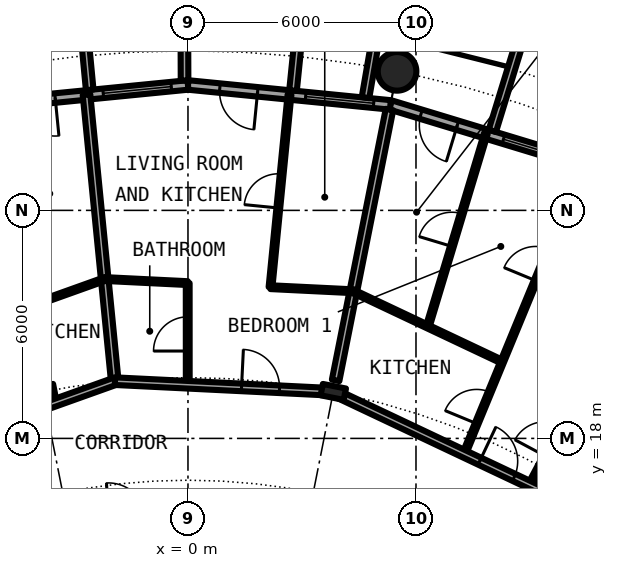
"""IFC4 building model, lengths in metres.
Left out: names, types, materials, properties, quantities, classifications, styles, units other than length and angle.
Written with IfcOpenShell. Run it as: python <this file> out.ifc"""

import sys

from ifc_helpers import new_model, si_unit, direction, frame, frame_2d, origin, origin_2d, place, context, subcontext, project, spatial, rectangle, circle, hollow_circle, i_section, extrude, element, fill, save


model = new_model("IFC4")
c1 = context("Model", 3, precision=1e-05, world=origin(), true_north=direction((0.0, 1.0)))
c2 = subcontext(c1, "Body", "Model", "MODEL_VIEW")
j1 = project(units=[si_unit("LENGTHUNIT", "METRE"), si_unit("PLANEANGLEUNIT", "RADIAN")], contexts=[c1])
p1 = place(None, origin())
s1 = spatial("IfcSite", under=j1, at=p1, CompositionType="ELEMENT")
p2 = place(p1, origin())
s2 = spatial("IfcBuilding", under=s1, at=p2, CompositionType="ELEMENT")
p3 = place(p2, frame((0.0, 0.0, 41.1)))
s3 = spatial("IfcBuildingStorey", under=s2, at=p3, CompositionType="ELEMENT", Elevation=41.1)
p4 = place(p3, frame((5.501, 27.658, 0.0), z_axis=(0.0, 0.0, 1.0), x_axis=(1.0, 0.0, 0.0)))
e1 = element("IfcColumn", 1, at=p4, inside=s3, PredefinedType="COLUMN", context=c2, shape_type="SweptSolid", body=[
    extrude(hollow_circle(Radius=0.508, WallThickness=0.05, at=origin_2d()), origin(), (0.0, 0.0, 1.0), 3.05),
])
for number, where, z_axis, x_axis in (
    (2, (3.824, 19.223, 0.0), (0.0, 0.0, 1.0), (0.195, 0.981, 0.0)),
    (3, (-3.824, 19.223, 0.0), (0.0, 0.0, 1.0), (-0.195, 0.981, 0.0)),
):
    element("IfcColumn", number, at=place(p3, frame(where, z_axis=z_axis, x_axis=x_axis)), inside=s3, PredefinedType="COLUMN", context=c2, shape_type="SweptSolid", body=[
        extrude(i_section(OverallWidth=0.305, OverallDepth=0.62, WebThickness=0.021, FlangeThickness=0.04, FilletRadius=0.027, at=origin_2d()), origin(), (0.0, 0.0, 1.0), 3.05),
    ])
p5 = place(p3, frame((10.447, 25.222, 0.0), z_axis=(0.0, 0.0, 1.0), x_axis=(-0.956965678721, 0.290201119486, 0.0)))
e4 = element("IfcWall", 4, at=p5, inside=s3, PredefinedType="SOLIDWALL", context=c2, shape_type="SweptSolid", body=[
    extrude(rectangle(XDim=5.351, YDim=0.25, at=frame_2d((2.676, 0.0))), origin(), (0.0, 0.0, 1.0), 2.7),
])
p6 = place(p5, frame((0.441, 0.0, 0.3)))
e5 = element("IfcOpeningElement", 5, at=p6, cuts=e4, PredefinedType="OPENING", context=c2, shape_type="SweptSolid", body=[
    extrude(rectangle(XDim=1.8, YDim=2.1, at=frame_2d((0.9, 1.05))), frame((0.0, 0.135, 0.0), z_axis=(0.0, -1.0, 0.0), x_axis=(1.0, 0.0, 0.0)), (0.0, 0.0, 1.0), 0.27),
])
p7 = place(p5, frame((3.51, 0.0, 0.0)))
e6 = element("IfcOpeningElement", 6, at=p7, cuts=e4, PredefinedType="OPENING", context=c2, shape_type="SweptSolid", body=[
    extrude(rectangle(XDim=1.0, YDim=2.2, at=frame_2d((0.5, 1.1))), frame((0.0, 0.135, 0.0), z_axis=(0.0, -1.0, 0.0), x_axis=(1.0, 0.0, 0.0)), (0.0, 0.0, 1.0), 0.27),
])
p8 = place(p3, frame((11.638, 28.084, -0.03), z_axis=(0.0, 0.0, 1.0), x_axis=(-0.941461077774, 0.337121697664, 0.0)))
e7 = element("IfcWall", 7, at=p8, inside=s3, PredefinedType="SOLIDWALL", context=c2, shape_type="SweptSolid", body=[
    extrude(rectangle(XDim=2.993, YDim=0.2, at=frame_2d((1.497, 0.0))), origin(), (0.0, 0.0, 1.0), 2.73),
])
p9 = place(p8, frame((0.457, 0.0, 0.33)))
e8 = element("IfcOpeningElement", 8, at=p9, cuts=e7, PredefinedType="OPENING", context=c2, shape_type="SweptSolid", body=[
    extrude(circle(Radius=1.04, at=frame_2d((1.04, 1.04))), frame((0.0, 0.11, 0.0), z_axis=(0.0, -1.0, 0.0), x_axis=(1.0, 0.0, 0.0)), (0.0, 0.0, 1.0), 0.22),
])
p10 = place(p3, frame((8.009, 26.092, -0.03), z_axis=(0.0, 0.0, 1.0), x_axis=(0.293406695073, 0.955987715029, 0.0)))
e9 = element("IfcWall", 9, at=p10, inside=s3, PredefinedType="SOLIDWALL", context=c2, shape_type="SweptSolid", body=[
    extrude(rectangle(XDim=3.006, YDim=0.2, at=frame_2d((1.503, 0.0))), origin(), (0.0, 0.0, 1.0), 2.73),
])
p11 = place(p3, frame((5.326, 26.775, 0.0), z_axis=(0.0, 0.0, 1.0), x_axis=(-0.995173996315, 0.098126026407, 0.0)))
e10 = element("IfcWall", 10, at=p11, inside=s3, PredefinedType="SOLIDWALL", context=c2, shape_type="SweptSolid", body=[
    extrude(rectangle(XDim=5.352, YDim=0.25, at=frame_2d((2.676, 0.0))), origin(), (0.0, 0.0, 1.0), 2.7),
])
p12 = place(p11, frame((0.441, 0.0, 0.3)))
e11 = element("IfcOpeningElement", 11, at=p12, cuts=e10, PredefinedType="OPENING", context=c2, shape_type="SweptSolid", body=[
    extrude(rectangle(XDim=1.8, YDim=2.1, at=frame_2d((0.9, 1.05))), frame((0.0, 0.135, 0.0), z_axis=(0.0, -1.0, 0.0), x_axis=(1.0, 0.0, 0.0)), (0.0, 0.0, 1.0), 0.27),
])
p13 = place(p11, frame((3.51, 0.0, 0.0)))
e12 = element("IfcOpeningElement", 12, at=p13, cuts=e10, PredefinedType="OPENING", context=c2, shape_type="SweptSolid", body=[
    extrude(rectangle(XDim=1.0, YDim=2.2, at=frame_2d((0.5, 1.1))), frame((0.0, 0.135, 0.0), z_axis=(0.0, -1.0, 0.0), x_axis=(1.0, 0.0, 0.0)), (0.0, 0.0, 1.0), 0.27),
])
p14 = place(p3, frame((4.671, 26.966, -0.03), z_axis=(0.0, 0.0, 1.0), x_axis=(0.170539878907, 0.985350774954, 0.0)))
e13 = element("IfcWall", 13, at=p14, inside=s3, PredefinedType="SOLIDWALL", context=c2, shape_type="SweptSolid", body=[
    extrude(rectangle(XDim=2.932, YDim=0.2, at=frame_2d((1.466, 0.0))), origin(), (0.0, 0.0, 1.0), 2.73),
])
p15 = place(p3, frame((2.764, 27.153, -0.03), z_axis=(0.0, 0.0, 1.0), x_axis=(0.101505487237, 0.994834979311, 0.0)))
e14 = element("IfcWall", 14, at=p15, inside=s3, PredefinedType="SOLIDWALL", context=c2, shape_type="SweptSolid", body=[
    extrude(rectangle(XDim=3.007, YDim=0.2, at=frame_2d((1.503, 0.0))), origin(), (0.0, 0.0, 1.0), 2.73),
])
p16 = place(p3, frame((0.0, 27.3, 0.0), z_axis=(0.0, 0.0, 1.0), x_axis=(-0.995173996315, -0.098126026407, 0.0)))
e15 = element("IfcWall", 15, at=p16, inside=s3, PredefinedType="SOLIDWALL", context=c2, shape_type="SweptSolid", body=[
    extrude(rectangle(XDim=5.352, YDim=0.25, at=frame_2d((2.676, 0.0))), origin(), (0.0, 0.0, 1.0), 2.7),
])
p17 = place(p16, frame((0.441, 0.0, 0.3)))
e16 = element("IfcOpeningElement", 16, at=p17, cuts=e15, PredefinedType="OPENING", context=c2, shape_type="SweptSolid", body=[
    extrude(rectangle(XDim=1.8, YDim=2.1, at=frame_2d((0.9, 1.05))), frame((0.0, 0.135, 0.0), z_axis=(0.0, -1.0, 0.0), x_axis=(1.0, 0.0, 0.0)), (0.0, 0.0, 1.0), 0.27),
])
p18 = place(p16, frame((3.51, 0.0, 0.0)))
e17 = element("IfcOpeningElement", 17, at=p18, cuts=e15, PredefinedType="OPENING", context=c2, shape_type="SweptSolid", body=[
    extrude(rectangle(XDim=1.0, YDim=2.2, at=frame_2d((0.5, 1.1))), frame((0.0, 0.135, 0.0), z_axis=(0.0, -1.0, 0.0), x_axis=(1.0, 0.0, 0.0)), (0.0, 0.0, 1.0), 0.27),
])
p19 = place(p3, frame((-0.09, 27.417, -0.03), z_axis=(0.0, 0.0, 1.0), x_axis=(-0.00347308367, 0.999993968827, 0.0)))
e18 = element("IfcWall", 18, at=p19, inside=s3, PredefinedType="SOLIDWALL", context=c2, shape_type="SweptSolid", body=[
    extrude(rectangle(XDim=2.882, YDim=0.2, at=frame_2d((1.441, 0.0))), origin(), (0.0, 0.0, 1.0), 2.73),
])
p20 = place(p3, frame((-2.586, 27.171, -0.03), z_axis=(0.0, 0.0, 1.0), x_axis=(-0.094548432284, 0.995520262954, 0.0)))
e19 = element("IfcWall", 19, at=p20, inside=s3, PredefinedType="SOLIDWALL", context=c2, shape_type="SweptSolid", body=[
    extrude(rectangle(XDim=3.006, YDim=0.2, at=frame_2d((1.503, 0.0))), origin(), (0.0, 0.0, 1.0), 2.73),
])
p21 = place(p3, frame((-2.67, 27.043, 0.0), z_axis=(0.0, 0.0, 1.0), x_axis=(0.098208010272, -0.995165909142, 0.0)))
e20 = element("IfcWall", 20, at=p21, inside=s3, PredefinedType="PARTITIONING", context=c2, shape_type="SweptSolid", body=[
    extrude(rectangle(XDim=7.575, YDim=0.2, at=frame_2d((3.787, 0.0))), origin(), (0.0, 0.0, 1.0), 2.7),
])
p22 = place(p3, frame((-0.006, 19.412, 0.0), z_axis=(0.0, 0.0, 1.0), x_axis=(-0.000365230071, 0.999999933303, 0.0)))
e21 = element("IfcWall", 21, at=p22, inside=s3, PredefinedType="PARTITIONING", context=c2, shape_type="SweptSolid", body=[
    extrude(rectangle(XDim=2.674, YDim=0.1, at=frame_2d((1.337, 0.0))), origin(), (0.0, 0.0, 1.0), 2.7),
])
p23 = place(p22, frame((0.887, 0.0, 0.0)))
e22 = element("IfcOpeningElement", 22, at=p23, cuts=e21, PredefinedType="OPENING", context=c2, shape_type="SweptSolid", body=[
    extrude(rectangle(XDim=0.9, YDim=2.3, at=frame_2d((0.45, 1.15))), frame((0.0, 0.06, 0.0), z_axis=(0.0, -1.0, 0.0), x_axis=(1.0, 0.0, 0.0)), (0.0, 0.0, 1.0), 0.12),
])
p24 = place(p3, frame((2.172, 21.979, 0.0), z_axis=(0.0, 0.0, 1.0), x_axis=(0.098259061871, 0.99516086979, 0.0)))
e23 = element("IfcWall", 23, at=p24, inside=s3, PredefinedType="PARTITIONING", context=c2, shape_type="SweptSolid", body=[
    extrude(rectangle(XDim=5.089, YDim=0.1, at=frame_2d((2.544, 0.0))), origin(), (0.0, 0.0, 1.0), 2.7),
])
p25 = place(p24, frame((2.094, 0.0, 0.0)))
e24 = element("IfcOpeningElement", 24, at=p25, cuts=e23, PredefinedType="OPENING", context=c2, shape_type="SweptSolid", body=[
    extrude(rectangle(XDim=0.9, YDim=2.3, at=frame_2d((0.45, 1.15))), frame((0.0, 0.06, 0.0), z_axis=(0.0, -1.0, 0.0), x_axis=(1.0, 0.0, 0.0)), (0.0, 0.0, 1.0), 0.12),
])
p26 = place(p3, frame((3.885, 19.527, 0.0), z_axis=(0.0, 0.0, 1.0), x_axis=(0.19503038749, 0.980797200218, 0.0)))
e25 = element("IfcWall", 25, at=p26, inside=s3, PredefinedType="PARTITIONING", context=c2, shape_type="SweptSolid", body=[
    extrude(rectangle(XDim=7.265, YDim=0.2, at=frame_2d((3.633, 0.0))), origin(), (0.0, 0.0, 1.0), 2.7),
])
p27 = place(p3, frame((6.31, 20.945, 0.0), z_axis=(0.0, 0.0, 1.0), x_axis=(0.288484435279, 0.957484585047, 0.0)))
e26 = element("IfcWall", 26, at=p27, inside=s3, PredefinedType="PARTITIONING", context=c2, shape_type="SweptSolid", body=[
    extrude(rectangle(XDim=5.3, YDim=0.1, at=frame_2d((2.65, 0.0))), origin(), (0.0, 0.0, 1.0), 2.7),
])
p28 = place(p27, frame((2.2, 0.0, 0.0)))
e27 = element("IfcOpeningElement", 27, at=p28, cuts=e26, PredefinedType="OPENING", context=c2, shape_type="SweptSolid", body=[
    extrude(rectangle(XDim=0.9, YDim=2.3, at=frame_2d((0.45, 1.15))), frame((0.0, 0.06, 0.0), z_axis=(0.0, -1.0, 0.0), x_axis=(1.0, 0.0, 0.0)), (0.0, 0.0, 1.0), 0.12),
])
p29 = place(p3, frame((7.268, 17.594, 0.0), z_axis=(0.0, 0.0, 1.0), x_axis=(0.381660983618, 0.924302382115, 0.0)))
e28 = element("IfcWall", 28, at=p29, inside=s3, PredefinedType="PARTITIONING", context=c2, shape_type="SweptSolid", body=[
    extrude(rectangle(XDim=8.138, YDim=0.1, at=frame_2d((4.069, 0.0))), origin(), (0.0, 0.0, 1.0), 2.7),
])
p30 = place(p29, frame((0.86, 0.0, 0.0)))
e29 = element("IfcOpeningElement", 29, at=p30, cuts=e28, PredefinedType="OPENING", context=c2, shape_type="SweptSolid", body=[
    extrude(rectangle(XDim=0.9, YDim=2.3, at=frame_2d((0.45, 1.15))), frame((0.0, 0.06, 0.0), z_axis=(0.0, -1.0, 0.0), x_axis=(1.0, 0.0, 0.0)), (0.0, 0.0, 1.0), 0.12),
])
p31 = place(p29, frame((4.93, 0.0, 0.0)))
e30 = element("IfcOpeningElement", 30, at=p31, cuts=e28, PredefinedType="OPENING", context=c2, shape_type="SweptSolid", body=[
    extrude(rectangle(XDim=0.9, YDim=2.3, at=frame_2d((0.45, 1.15))), frame((0.0, 0.06, 0.0), z_axis=(0.0, -1.0, 0.0), x_axis=(1.0, 0.0, 0.0)), (0.0, 0.0, 1.0), 0.12),
])
p32 = place(p3, frame((8.99, 16.78, 0.0), z_axis=(0.0, 0.0, 1.0), x_axis=(0.472216244249, 0.881482738723, 0.0)))
e31 = element("IfcWall", 31, at=p32, inside=s3, PredefinedType="PARTITIONING", context=c2, shape_type="SweptSolid", body=[
    extrude(rectangle(XDim=2.622, YDim=0.1, at=frame_2d((1.311, 0.0))), origin(), (0.0, 0.0, 1.0), 2.7),
])
p33 = place(p32, frame((0.861, 0.0, 0.0)))
e32 = element("IfcOpeningElement", 32, at=p33, cuts=e31, PredefinedType="OPENING", context=c2, shape_type="SweptSolid", body=[
    extrude(rectangle(XDim=0.9, YDim=2.3, at=frame_2d((0.45, 1.15))), frame((0.0, 0.06, 0.0), z_axis=(0.0, -1.0, 0.0), x_axis=(1.0, 0.0, 0.0)), (0.0, 0.0, 1.0), 0.12),
])
p34 = place(p3, frame((-10.742, 16.351, 0.0), z_axis=(0.0, 0.0, 1.0), x_axis=(0.941707755593, 0.336432018476, 0.0)))
e33 = element("IfcWall", 33, at=p34, inside=s3, PredefinedType="PARTITIONING", context=c2, shape_type="SweptSolid", body=[
    extrude(rectangle(XDim=9.381, YDim=0.2, at=frame_2d((4.69, 0.0))), origin(), (0.0, 0.0, 1.0), 2.38),
])
p35 = place(p34, frame((4.106, 0.0, 0.0)))
e34 = element("IfcOpeningElement", 34, at=p35, cuts=e33, PredefinedType="OPENING", context=c2, shape_type="SweptSolid", body=[
    extrude(rectangle(XDim=1.0, YDim=2.3, at=frame_2d((0.5, 1.15))), frame((0.0, 0.11, 0.0), z_axis=(0.0, -1.0, 0.0), x_axis=(1.0, 0.0, 0.0)), (0.0, 0.0, 1.0), 0.22),
])
p36 = place(p3, frame((3.966, 19.154, 0.0), z_axis=(0.0, 0.0, 1.0), x_axis=(0.904067688688, -0.427389300603, 0.0)))
e35 = element("IfcWall", 35, at=p36, inside=s3, PredefinedType="PARTITIONING", context=c2, shape_type="SweptSolid", body=[
    extrude(rectangle(XDim=9.366, YDim=0.2, at=frame_2d((4.683, 0.0))), origin(), (0.0, 0.0, 1.0), 2.38),
])
p37 = place(p36, frame((4.104, 0.0, 0.0)))
e36 = element("IfcOpeningElement", 36, at=p37, cuts=e35, PredefinedType="OPENING", context=c2, shape_type="SweptSolid", body=[
    extrude(rectangle(XDim=1.0, YDim=2.3, at=frame_2d((0.5, 1.15))), frame((0.0, 0.11, 0.0), z_axis=(0.0, -1.0, 0.0), x_axis=(1.0, 0.0, 0.0)), (0.0, 0.0, 1.0), 0.22),
])
p38 = place(p3, frame((-1.921, 19.506, 0.0), z_axis=(0.0, 0.0, 1.0), x_axis=(0.99879118777, -0.049154483346, 0.0)))
e37 = element("IfcWall", 37, at=p38, inside=s3, PredefinedType="PARTITIONING", context=c2, shape_type="SweptSolid", body=[
    extrude(rectangle(XDim=5.598, YDim=0.2, at=frame_2d((2.799, 0.0))), origin(), (0.0, 0.0, 1.0), 2.38),
])
p39 = place(p38, frame((3.334, 0.0, 0.0)))
e38 = element("IfcOpeningElement", 38, at=p39, cuts=e37, PredefinedType="OPENING", context=c2, shape_type="SweptSolid", body=[
    extrude(rectangle(XDim=1.0, YDim=2.3, at=frame_2d((0.5, 1.15))), frame((0.0, 0.11, 0.0), z_axis=(0.0, -1.0, 0.0), x_axis=(1.0, 0.0, 0.0)), (0.0, 0.0, 1.0), 0.22),
])
p40 = place(p3, frame((-6.273, 20.73, 0.0), z_axis=(0.0, 0.0, 1.0), x_axis=(0.941501535708, 0.337008691666, 0.0)))
e39 = element("IfcWall", 39, at=p40, inside=s3, PredefinedType="PARTITIONING", context=c2, shape_type="SweptSolid", body=[
    extrude(rectangle(XDim=4.347, YDim=0.1, at=frame_2d((2.174, 0.0))), origin(), (0.0, 0.0, 1.0), 2.7),
])
p41 = place(p3, frame((4.337, 21.874, 0.0), z_axis=(0.0, 0.0, 1.0), x_axis=(0.904130816667, -0.427255738818, 0.0)))
e40 = element("IfcWall", 40, at=p41, inside=s3, PredefinedType="PARTITIONING", context=c2, shape_type="SweptSolid", body=[
    extrude(rectangle(XDim=4.335, YDim=0.1, at=frame_2d((2.167, 0.0))), origin(), (0.0, 0.0, 1.0), 2.7),
])
for number, where, z_axis, x_axis in (
    (41, (-2.186, 22.193, 0.0), (0.0, 0.0, 1.0), (0.999, -0.049, 0.0)),
    (42, (2.172, 21.979, 0.0), (0.0, 0.0, 1.0), (0.999, -0.049, 0.0)),
):
    element("IfcWall", number, at=place(p3, frame(where, z_axis=z_axis, x_axis=x_axis)), inside=s3, PredefinedType="PARTITIONING", context=c2, shape_type="SweptSolid", body=[
        extrude(rectangle(XDim=2.182, YDim=0.1, at=frame_2d((1.091, 0.0))), origin(), (0.0, 0.0, 1.0), 2.7),
    ])
p42 = place(p6, origin())
e43 = element("IfcWindow", 43, at=p42, inside=s3, PartitioningType="SINGLE_PANEL", PredefinedType="WINDOW", context=c2, shape_type="SweptSolid", body=[
    extrude(rectangle(XDim=1.8, YDim=2.1, at=frame_2d((0.9, 1.05))), frame((0.0, 0.03, 0.0), z_axis=(0.0, -1.0, 0.0), x_axis=(1.0, 0.0, 0.0)), (0.0, 0.0, 1.0), 0.06),
])
fill(e5, e43)
p43 = place(p7, origin())
e44 = element("IfcDoor", 44, at=p43, inside=s3, OperationType="SINGLE_SWING_LEFT", PredefinedType="DOOR", context=c2, shape_type="SweptSolid", body=[
    extrude(rectangle(XDim=1.0, YDim=2.2, at=frame_2d((0.5, 1.1))), frame((0.0, 0.025, 0.0), z_axis=(0.0, -1.0, 0.0), x_axis=(1.0, 0.0, 0.0)), (0.0, 0.0, 1.0), 0.05),
])
fill(e6, e44)
p44 = place(p12, origin())
e45 = element("IfcWindow", 45, at=p44, inside=s3, PartitioningType="SINGLE_PANEL", PredefinedType="WINDOW", context=c2, shape_type="SweptSolid", body=[
    extrude(rectangle(XDim=1.8, YDim=2.1, at=frame_2d((0.9, 1.05))), frame((0.0, 0.03, 0.0), z_axis=(0.0, -1.0, 0.0), x_axis=(1.0, 0.0, 0.0)), (0.0, 0.0, 1.0), 0.06),
])
fill(e11, e45)
p45 = place(p13, origin())
e46 = element("IfcDoor", 46, at=p45, inside=s3, OperationType="SINGLE_SWING_LEFT", PredefinedType="DOOR", context=c2, shape_type="SweptSolid", body=[
    extrude(rectangle(XDim=1.0, YDim=2.2, at=frame_2d((0.5, 1.1))), frame((0.0, 0.025, 0.0), z_axis=(0.0, -1.0, 0.0), x_axis=(1.0, 0.0, 0.0)), (0.0, 0.0, 1.0), 0.05),
])
fill(e12, e46)
p46 = place(p17, origin())
e47 = element("IfcWindow", 47, at=p46, inside=s3, PartitioningType="SINGLE_PANEL", PredefinedType="WINDOW", context=c2, shape_type="SweptSolid", body=[
    extrude(rectangle(XDim=1.8, YDim=2.1, at=frame_2d((0.9, 1.05))), frame((0.0, 0.03, 0.0), z_axis=(0.0, -1.0, 0.0), x_axis=(1.0, 0.0, 0.0)), (0.0, 0.0, 1.0), 0.06),
])
fill(e16, e47)
p47 = place(p18, origin())
e48 = element("IfcDoor", 48, at=p47, inside=s3, OperationType="SINGLE_SWING_LEFT", PredefinedType="DOOR", context=c2, shape_type="SweptSolid", body=[
    extrude(rectangle(XDim=1.0, YDim=2.2, at=frame_2d((0.5, 1.1))), frame((0.0, 0.025, 0.0), z_axis=(0.0, -1.0, 0.0), x_axis=(1.0, 0.0, 0.0)), (0.0, 0.0, 1.0), 0.05),
])
fill(e17, e48)
p48 = place(p37, origin())
e49 = element("IfcDoor", 49, at=p48, inside=s3, OperationType="SINGLE_SWING_LEFT", PredefinedType="DOOR", context=c2, shape_type="SweptSolid", body=[
    extrude(rectangle(XDim=1.0, YDim=2.3, at=frame_2d((0.5, 1.15))), frame((0.0, 0.025, 0.0), z_axis=(0.0, -1.0, 0.0), x_axis=(1.0, 0.0, 0.0)), (0.0, 0.0, 1.0), 0.05),
])
fill(e36, e49)
p49 = place(p30, origin())
e50 = element("IfcDoor", 50, at=p49, inside=s3, OperationType="SINGLE_SWING_LEFT", PredefinedType="DOOR", context=c2, shape_type="SweptSolid", body=[
    extrude(rectangle(XDim=0.9, YDim=2.3, at=frame_2d((0.45, 1.15))), frame((0.0, 0.025, 0.0), z_axis=(0.0, -1.0, 0.0), x_axis=(1.0, 0.0, 0.0)), (0.0, 0.0, 1.0), 0.05),
])
fill(e29, e50)
p50 = place(p31, origin())
e51 = element("IfcDoor", 51, at=p50, inside=s3, OperationType="SINGLE_SWING_RIGHT", PredefinedType="DOOR", context=c2, shape_type="SweptSolid", body=[
    extrude(rectangle(XDim=0.9, YDim=2.3, at=frame_2d((0.45, 1.15))), frame((0.0, 0.025, 0.0), z_axis=(0.0, -1.0, 0.0), x_axis=(1.0, 0.0, 0.0)), (0.0, 0.0, 1.0), 0.05),
])
fill(e30, e51)
p51 = place(p28, origin())
e52 = element("IfcDoor", 52, at=p51, inside=s3, OperationType="SINGLE_SWING_RIGHT", PredefinedType="DOOR", context=c2, shape_type="SweptSolid", body=[
    extrude(rectangle(XDim=0.9, YDim=2.3, at=frame_2d((0.45, 1.15))), frame((0.0, 0.025, 0.0), z_axis=(0.0, -1.0, 0.0), x_axis=(1.0, 0.0, 0.0)), (0.0, 0.0, 1.0), 0.05),
])
fill(e27, e52)
p52 = place(p39, origin())
e53 = element("IfcDoor", 53, at=p52, inside=s3, OperationType="SINGLE_SWING_RIGHT", PredefinedType="DOOR", context=c2, shape_type="SweptSolid", body=[
    extrude(rectangle(XDim=1.0, YDim=2.3, at=frame_2d((0.5, 1.15))), frame((0.0, 0.025, 0.0), z_axis=(0.0, -1.0, 0.0), x_axis=(1.0, 0.0, 0.0)), (0.0, 0.0, 1.0), 0.05),
])
fill(e38, e53)
p53 = place(p23, origin())
e54 = element("IfcDoor", 54, at=p53, inside=s3, OperationType="SINGLE_SWING_LEFT", PredefinedType="DOOR", context=c2, shape_type="SweptSolid", body=[
    extrude(rectangle(XDim=0.9, YDim=2.3, at=frame_2d((0.45, 1.15))), frame((0.0, 0.025, 0.0), z_axis=(0.0, -1.0, 0.0), x_axis=(1.0, 0.0, 0.0)), (0.0, 0.0, 1.0), 0.05),
])
fill(e22, e54)
p54 = place(p25, origin())
e55 = element("IfcDoor", 55, at=p54, inside=s3, OperationType="SINGLE_SWING_LEFT", PredefinedType="DOOR", context=c2, shape_type="SweptSolid", body=[
    extrude(rectangle(XDim=0.9, YDim=2.3, at=frame_2d((0.45, 1.15))), frame((0.0, 0.025, 0.0), z_axis=(0.0, -1.0, 0.0), x_axis=(1.0, 0.0, 0.0)), (0.0, 0.0, 1.0), 0.05),
])
fill(e24, e55)
save(model, sys.argv[1])
